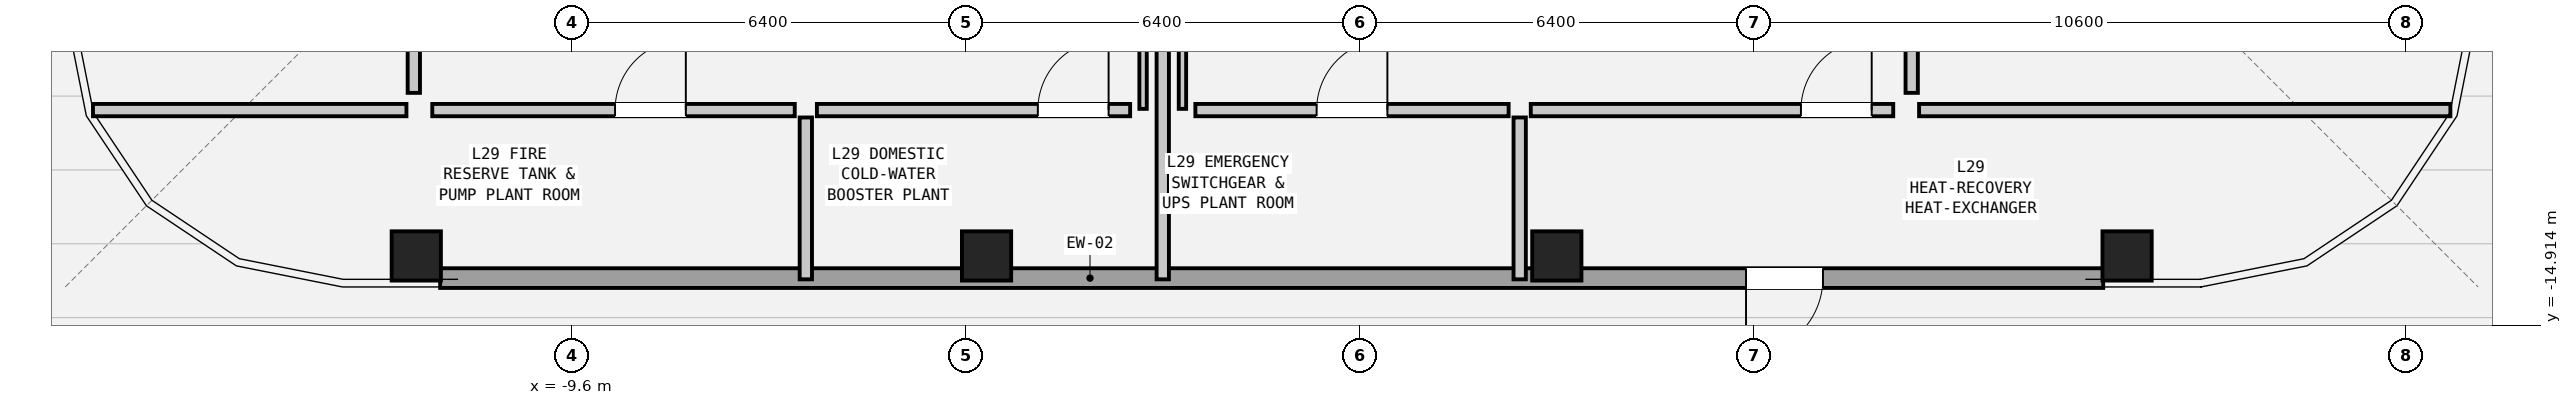
"""IFC4 building model, lengths in metres.
Left out: names, types, materials, properties, quantities, classifications, styles, units other than length and angle.
Written with IfcOpenShell. Run it as: python <this file> out.ifc"""

import sys

from ifc_helpers import new_model, si_unit, direction, frame, frame_2d, origin, origin_2d, place, context, subcontext, project, spatial, rectangle, hollow_rectangle, extrude, element, fill, save


model = new_model("IFC4")
c1 = context("Model", 3, precision=1e-05, world=origin(), true_north=direction((0.0, 1.0)))
c2 = subcontext(c1, "Body", "Model", "MODEL_VIEW")
j1 = project(units=[si_unit("LENGTHUNIT", "METRE"), si_unit("PLANEANGLEUNIT", "RADIAN")], contexts=[c1])
p1 = place(None, origin())
s1 = spatial("IfcSite", under=j1, at=p1, CompositionType="ELEMENT")
p2 = place(p1, origin())
s2 = spatial("IfcBuilding", under=s1, at=p2, CompositionType="ELEMENT")
p3 = place(p2, frame((0.0, 0.0, 101.25)))
s3 = spatial("IfcBuildingStorey", under=s2, at=p3, CompositionType="ELEMENT", Elevation=101.25)
for number, where, z_axis, x_axis in (
    (1, (-12.13, -13.79, 0.0), (0.0, 0.0, 1.0), (1.0, 0.0, 0.0)),
    (2, (-2.863, -13.79, 0.0), (0.0, 0.0, 1.0), (1.0, 0.0, 0.0)),
    (3, (6.403, -13.79, 0.0), (0.0, 0.0, 1.0), (1.0, 0.0, 0.0)),
    (4, (15.67, -13.79, 0.0), (0.0, 0.0, 1.0), (1.0, 0.0, 0.0)),
):
    element("IfcColumn", number, at=place(p3, frame(where, z_axis=z_axis, x_axis=x_axis)), inside=s3, PredefinedType="COLUMN", context=c2, shape_type="SweptSolid", body=[
        extrude(hollow_rectangle(XDim=0.8, YDim=0.8, WallThickness=0.05, at=origin_2d()), origin(), (0.0, 0.0, 1.0), 3.6),
    ])
p4 = place(p3, frame((15.282, -14.15, 0.0), z_axis=(0.0, 0.0, 1.0), x_axis=(-1.0, 0.0, 0.0)))
e5 = element("IfcWall", 5, at=p4, inside=s3, PredefinedType="SOLIDWALL", context=c2, shape_type="SweptSolid", body=[
    extrude(rectangle(XDim=27.024, YDim=0.32, at=frame_2d((13.512, 0.0))), origin(), (0.0, 0.0, 1.0), 2.082),
])
p5 = place(p4, frame((4.554, 0.0, 0.0)))
e6 = element("IfcOpeningElement", 6, at=p5, cuts=e5, PredefinedType="OPENING", context=c2, shape_type="SweptSolid", body=[
    extrude(rectangle(XDim=1.25, YDim=2.02, at=frame_2d((0.625, 1.01))), frame((0.0, 0.172, 0.0), z_axis=(0.0, -1.0, 0.0), x_axis=(1.0, 0.0, 0.0)), (0.0, 0.0, 1.0), 0.344),
])
p6 = place(p3, frame((0.0, -14.17, 0.0), z_axis=(0.0, 0.0, 1.0), x_axis=(0.0, 1.0, 0.0)))
e7 = element("IfcWall", 7, at=p6, inside=s3, PredefinedType="PARTITIONING", context=c2, shape_type="SweptSolid", body=[
    extrude(rectangle(XDim=5.13, YDim=0.2, at=frame_2d((2.565, 0.0))), origin(), (0.0, 0.0, 1.0), 2.741),
])
for number, where, z_axis, x_axis in (
    (8, (-0.32, -11.4, 0.0), (0.0, 0.0, 1.0), (0.0, 1.0, 0.0)),
    (9, (0.32, -11.4, 0.0), (0.0, 0.0, 1.0), (0.0, 1.0, 0.0)),
):
    element("IfcWall", number, at=place(p3, frame(where, z_axis=z_axis, x_axis=x_axis)), inside=s3, PredefinedType="PARTITIONING", context=c2, shape_type="SweptSolid", body=[
        extrude(rectangle(XDim=2.36, YDim=0.12, at=frame_2d((1.18, 0.0))), origin(), (0.0, 0.0, 1.0), 2.741),
    ])
p7 = place(p3, frame((-11.87, -11.42, 0.0), z_axis=(0.0, 0.0, 1.0), x_axis=(1.0, 0.0, 0.0)))
e10 = element("IfcWall", 10, at=p7, inside=s3, PredefinedType="PARTITIONING", context=c2, shape_type="SweptSolid", body=[
    extrude(rectangle(XDim=5.89, YDim=0.2, at=frame_2d((2.945, 0.0))), origin(), (0.0, 0.0, 1.0), 2.741),
])
p8 = place(p7, frame((2.97, 0.0, 0.0)))
e11 = element("IfcOpeningElement", 11, at=p8, cuts=e10, PredefinedType="OPENING", context=c2, shape_type="SweptSolid", body=[
    extrude(rectangle(XDim=1.15, YDim=2.1, at=frame_2d((0.575, 1.05))), frame((0.0, 0.112, 0.0), z_axis=(0.0, -1.0, 0.0), x_axis=(1.0, 0.0, 0.0)), (0.0, 0.0, 1.0), 0.224),
])
p9 = place(p3, frame((-5.8, -14.17, 0.0), z_axis=(0.0, 0.0, 1.0), x_axis=(0.0, 1.0, 0.0)))
e12 = element("IfcWall", 12, at=p9, inside=s3, PredefinedType="PARTITIONING", context=c2, shape_type="SweptSolid", body=[
    extrude(rectangle(XDim=2.63, YDim=0.2, at=frame_2d((1.315, 0.0))), origin(), (0.0, 0.0, 1.0), 1.4),
])
p10 = place(p3, frame((-5.62, -11.42, 0.0), z_axis=(0.0, 0.0, 1.0), x_axis=(1.0, 0.0, 0.0)))
e13 = element("IfcWall", 13, at=p10, inside=s3, PredefinedType="PARTITIONING", context=c2, shape_type="SweptSolid", body=[
    extrude(rectangle(XDim=5.09, YDim=0.2, at=frame_2d((2.545, 0.0))), origin(), (0.0, 0.0, 1.0), 3.22),
])
p11 = place(p10, frame((3.59, 0.0, 0.0)))
e14 = element("IfcOpeningElement", 14, at=p11, cuts=e13, PredefinedType="OPENING", context=c2, shape_type="SweptSolid", body=[
    extrude(rectangle(XDim=1.15, YDim=2.1, at=frame_2d((0.575, 1.05))), frame((0.0, 0.112, 0.0), z_axis=(0.0, -1.0, 0.0), x_axis=(1.0, 0.0, 0.0)), (0.0, 0.0, 1.0), 0.224),
])
p12 = place(p3, frame((0.53, -11.42, 0.0), z_axis=(0.0, 0.0, 1.0), x_axis=(1.0, 0.0, 0.0)))
e15 = element("IfcWall", 15, at=p12, inside=s3, PredefinedType="PARTITIONING", context=c2, shape_type="SweptSolid", body=[
    extrude(rectangle(XDim=5.09, YDim=0.2, at=frame_2d((2.545, 0.0))), origin(), (0.0, 0.0, 1.0), 3.22),
])
p13 = place(p12, frame((1.97, 0.0, 0.0)))
e16 = element("IfcOpeningElement", 16, at=p13, cuts=e15, PredefinedType="OPENING", context=c2, shape_type="SweptSolid", body=[
    extrude(rectangle(XDim=1.15, YDim=2.1, at=frame_2d((0.575, 1.05))), frame((0.0, 0.112, 0.0), z_axis=(0.0, -1.0, 0.0), x_axis=(1.0, 0.0, 0.0)), (0.0, 0.0, 1.0), 0.224),
])
p14 = place(p3, frame((5.8, -14.17, 0.0), z_axis=(0.0, 0.0, 1.0), x_axis=(0.0, 1.0, 0.0)))
e17 = element("IfcWall", 17, at=p14, inside=s3, PredefinedType="PARTITIONING", context=c2, shape_type="SweptSolid", body=[
    extrude(rectangle(XDim=2.63, YDim=0.2, at=frame_2d((1.315, 0.0))), origin(), (0.0, 0.0, 1.0), 2.741),
])
p15 = place(p3, frame((5.98, -11.42, 0.0), z_axis=(0.0, 0.0, 1.0), x_axis=(1.0, 0.0, 0.0)))
e18 = element("IfcWall", 18, at=p15, inside=s3, PredefinedType="PARTITIONING", context=c2, shape_type="SweptSolid", body=[
    extrude(rectangle(XDim=5.89, YDim=0.2, at=frame_2d((2.945, 0.0))), origin(), (0.0, 0.0, 1.0), 2.741),
])
p16 = place(p15, frame((4.39, 0.0, 0.0)))
e19 = element("IfcOpeningElement", 19, at=p16, cuts=e18, PredefinedType="OPENING", context=c2, shape_type="SweptSolid", body=[
    extrude(rectangle(XDim=1.15, YDim=2.1, at=frame_2d((0.575, 1.05))), frame((0.0, 0.112, 0.0), z_axis=(0.0, -1.0, 0.0), x_axis=(1.0, 0.0, 0.0)), (0.0, 0.0, 1.0), 0.224),
])
p17 = place(p3, frame((-17.384, -11.42, 0.0), z_axis=(0.0, 0.0, 1.0), x_axis=(1.0, 0.0, 0.0)))
e20 = element("IfcWall", 20, at=p17, inside=s3, PredefinedType="PARTITIONING", context=c2, shape_type="SweptSolid", body=[
    extrude(rectangle(XDim=5.094, YDim=0.2, at=frame_2d((2.547, 0.0))), origin(), (0.0, 0.0, 1.0), 2.741),
])
p18 = place(p3, frame((12.29, -11.42, 0.0), z_axis=(0.0, 0.0, 1.0), x_axis=(1.0, 0.0, 0.0)))
e21 = element("IfcWall", 21, at=p18, inside=s3, PredefinedType="PARTITIONING", context=c2, shape_type="SweptSolid", body=[
    extrude(rectangle(XDim=8.634, YDim=0.2, at=frame_2d((4.317, 0.0))), origin(), (0.0, 0.0, 1.0), 2.741),
])
p19 = place(p3, frame((-12.17, -11.14, 0.0), z_axis=(0.0, 0.0, 1.0), x_axis=(0.0, 1.0, 0.0)))
e22 = element("IfcWall", 22, at=p19, inside=s3, PredefinedType="PARTITIONING", context=c2, shape_type="SweptSolid", body=[
    extrude(rectangle(XDim=11.53, YDim=0.2, at=frame_2d((5.765, 0.0))), origin(), (0.0, 0.0, 1.0), 3.22),
])
p20 = place(p19, frame((5.19, 0.0, 0.0)))
e23 = element("IfcOpeningElement", 23, at=p20, cuts=e22, PredefinedType="OPENING", context=c2, shape_type="SweptSolid", body=[
    extrude(rectangle(XDim=1.15, YDim=2.1, at=frame_2d((0.575, 1.05))), frame((0.0, 0.112, 0.0), z_axis=(0.0, -1.0, 0.0), x_axis=(1.0, 0.0, 0.0)), (0.0, 0.0, 1.0), 0.224),
])
p21 = place(p3, frame((12.17, -11.14, 0.0), z_axis=(0.0, 0.0, 1.0), x_axis=(0.0, 1.0, 0.0)))
e24 = element("IfcWall", 24, at=p21, inside=s3, PredefinedType="PARTITIONING", context=c2, shape_type="SweptSolid", body=[
    extrude(rectangle(XDim=11.53, YDim=0.2, at=frame_2d((5.765, 0.0))), origin(), (0.0, 0.0, 1.0), 3.22),
])
p22 = place(p21, frame((5.19, 0.0, 0.0)))
e25 = element("IfcOpeningElement", 25, at=p22, cuts=e24, PredefinedType="OPENING", context=c2, shape_type="SweptSolid", body=[
    extrude(rectangle(XDim=1.15, YDim=2.1, at=frame_2d((0.575, 1.05))), frame((0.0, 0.112, 0.0), z_axis=(0.0, -1.0, 0.0), x_axis=(1.0, 0.0, 0.0)), (0.0, 0.0, 1.0), 0.224),
])
p23 = place(p5, origin())
e26 = element("IfcDoor", 26, at=p23, inside=s3, OperationType="SINGLE_SWING_RIGHT", PredefinedType="DOOR", context=c2, shape_type="SweptSolid", body=[
    extrude(rectangle(XDim=1.25, YDim=2.02, at=frame_2d((0.625, 1.01))), frame((0.0, 0.025, 0.0), z_axis=(0.0, -1.0, 0.0), x_axis=(1.0, 0.0, 0.0)), (0.0, 0.0, 1.0), 0.05),
])
fill(e6, e26)
p24 = place(p8, origin())
e27 = element("IfcDoor", 27, at=p24, inside=s3, OperationType="SINGLE_SWING_RIGHT", PredefinedType="DOOR", context=c2, shape_type="SweptSolid", body=[
    extrude(rectangle(XDim=1.15, YDim=2.1, at=frame_2d((0.575, 1.05))), frame((0.0, 0.025, 0.0), z_axis=(0.0, -1.0, 0.0), x_axis=(1.0, 0.0, 0.0)), (0.0, 0.0, 1.0), 0.05),
])
fill(e11, e27)
p25 = place(p11, origin())
e28 = element("IfcDoor", 28, at=p25, inside=s3, OperationType="SINGLE_SWING_RIGHT", PredefinedType="DOOR", context=c2, shape_type="SweptSolid", body=[
    extrude(rectangle(XDim=1.15, YDim=2.1, at=frame_2d((0.575, 1.05))), frame((0.0, 0.025, 0.0), z_axis=(0.0, -1.0, 0.0), x_axis=(1.0, 0.0, 0.0)), (0.0, 0.0, 1.0), 0.05),
])
fill(e14, e28)
p26 = place(p13, origin())
e29 = element("IfcDoor", 29, at=p26, inside=s3, OperationType="SINGLE_SWING_RIGHT", PredefinedType="DOOR", context=c2, shape_type="SweptSolid", body=[
    extrude(rectangle(XDim=1.15, YDim=2.1, at=frame_2d((0.575, 1.05))), frame((0.0, 0.025, 0.0), z_axis=(0.0, -1.0, 0.0), x_axis=(1.0, 0.0, 0.0)), (0.0, 0.0, 1.0), 0.05),
])
fill(e16, e29)
p27 = place(p16, origin())
e30 = element("IfcDoor", 30, at=p27, inside=s3, OperationType="SINGLE_SWING_RIGHT", PredefinedType="DOOR", context=c2, shape_type="SweptSolid", body=[
    extrude(rectangle(XDim=1.15, YDim=2.1, at=frame_2d((0.575, 1.05))), frame((0.0, 0.025, 0.0), z_axis=(0.0, -1.0, 0.0), x_axis=(1.0, 0.0, 0.0)), (0.0, 0.0, 1.0), 0.05),
])
fill(e19, e30)
save(model, sys.argv[1])
